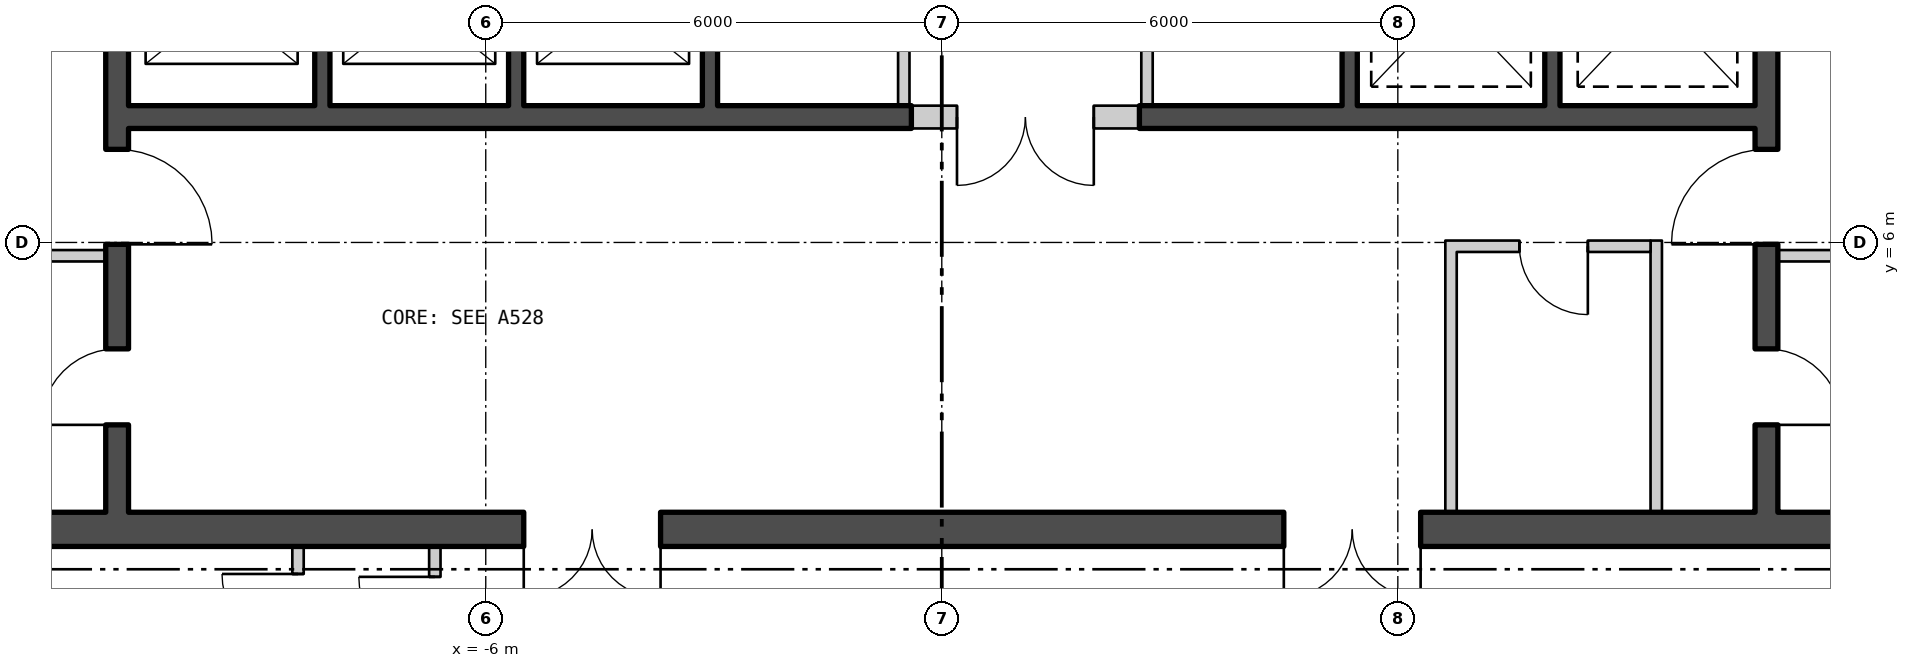
"""IFC4 building model, lengths in metres.
Left out: names, types, materials, properties, quantities, classifications, styles, units other than length and angle.
Written with IfcOpenShell. Run it as: python <this file> out.ifc"""

import sys

from ifc_helpers import new_model, si_unit, direction, frame, frame_2d, origin, place, context, subcontext, project, spatial, polyline, rectangle, outline, extrude, element, fill, save


model = new_model("IFC4")
c1 = context("Model", 3, precision=1e-05, world=origin(), true_north=direction((0.0, 1.0)))
c2 = subcontext(c1, "Body", "Model", "MODEL_VIEW")
j1 = project(units=[si_unit("LENGTHUNIT", "METRE"), si_unit("PLANEANGLEUNIT", "RADIAN")], contexts=[c1])
p1 = place(None, origin())
s1 = spatial("IfcSite", under=j1, at=p1, CompositionType="ELEMENT")
p2 = place(p1, origin())
s2 = spatial("IfcBuilding", under=s1, at=p2, CompositionType="ELEMENT")
p3 = place(p2, frame((0.0, 0.0, 227.7)))
s3 = spatial("IfcBuildingStorey", under=s2, at=p3, CompositionType="ELEMENT", Elevation=227.7)
p4 = place(p3, frame((-26.075, 14.415, -0.18), z_axis=(0.0, 0.0, 1.0), x_axis=(0.499999194392, -0.866025868902, 0.0)))
e1 = element("IfcWall", 1, at=p4, inside=s3, PredefinedType="SOLIDWALL", context=c2, shape_type="SweptSolid", body=[
    extrude(outline(polyline([(-0.13, -0.225), (45.86, -0.225), (45.6, 0.225), (0.13, 0.225), (-0.13, -0.225)])), origin(), (0.0, 0.0, 1.0), 3.68),
])
p5 = place(p4, frame((1.424, 0.0, 1.08)))
e2 = element("IfcOpeningElement", 2, at=p5, cuts=e1, PredefinedType="OPENING", context=c2, shape_type="SweptSolid", body=[
    extrude(rectangle(XDim=2.4, YDim=2.0, at=frame_2d((1.2, 1.0))), frame((0.0, 0.235, 0.0), z_axis=(0.0, -1.0, 0.0), x_axis=(1.0, 0.0, 0.0)), (0.0, 0.0, 1.0), 0.47),
])
p6 = place(p4, frame((5.892, 0.0, 1.08)))
e3 = element("IfcOpeningElement", 3, at=p6, cuts=e1, PredefinedType="OPENING", context=c2, shape_type="SweptSolid", body=[
    extrude(rectangle(XDim=2.4, YDim=2.0, at=frame_2d((1.2, 1.0))), frame((0.0, 0.235, 0.0), z_axis=(0.0, -1.0, 0.0), x_axis=(1.0, 0.0, 0.0)), (0.0, 0.0, 1.0), 0.47),
])
p7 = place(p4, frame((10.399, 0.0, 1.08)))
e4 = element("IfcOpeningElement", 4, at=p7, cuts=e1, PredefinedType="OPENING", context=c2, shape_type="SweptSolid", body=[
    extrude(rectangle(XDim=2.4, YDim=2.0, at=frame_2d((1.2, 1.0))), frame((0.0, 0.235, 0.0), z_axis=(0.0, -1.0, 0.0), x_axis=(1.0, 0.0, 0.0)), (0.0, 0.0, 1.0), 0.47),
])
p8 = place(p4, frame((19.412, 0.0, 1.08)))
e5 = element("IfcOpeningElement", 5, at=p8, cuts=e1, PredefinedType="OPENING", context=c2, shape_type="SweptSolid", body=[
    extrude(rectangle(XDim=2.4, YDim=2.0, at=frame_2d((1.2, 1.0))), frame((0.0, 0.235, 0.0), z_axis=(0.0, -1.0, 0.0), x_axis=(1.0, 0.0, 0.0)), (0.0, 0.0, 1.0), 0.47),
])
p9 = place(p4, frame((23.918, 0.0, 1.08)))
e6 = element("IfcOpeningElement", 6, at=p9, cuts=e1, PredefinedType="OPENING", context=c2, shape_type="SweptSolid", body=[
    extrude(rectangle(XDim=2.4, YDim=2.0, at=frame_2d((1.2, 1.0))), frame((0.0, 0.235, 0.0), z_axis=(0.0, -1.0, 0.0), x_axis=(1.0, 0.0, 0.0)), (0.0, 0.0, 1.0), 0.47),
])
p10 = place(p4, frame((28.425, 0.0, 1.08)))
e7 = element("IfcOpeningElement", 7, at=p10, cuts=e1, PredefinedType="OPENING", context=c2, shape_type="SweptSolid", body=[
    extrude(rectangle(XDim=2.4, YDim=2.0, at=frame_2d((1.2, 1.0))), frame((0.0, 0.235, 0.0), z_axis=(0.0, -1.0, 0.0), x_axis=(1.0, 0.0, 0.0)), (0.0, 0.0, 1.0), 0.47),
])
p11 = place(p4, frame((32.932, 0.0, 1.08)))
e8 = element("IfcOpeningElement", 8, at=p11, cuts=e1, PredefinedType="OPENING", context=c2, shape_type="SweptSolid", body=[
    extrude(rectangle(XDim=2.4, YDim=2.0, at=frame_2d((1.2, 1.0))), frame((0.0, 0.235, 0.0), z_axis=(0.0, -1.0, 0.0), x_axis=(1.0, 0.0, 0.0)), (0.0, 0.0, 1.0), 0.47),
])
p12 = place(p4, frame((41.907, 0.0, 1.08)))
e9 = element("IfcOpeningElement", 9, at=p12, cuts=e1, PredefinedType="OPENING", context=c2, shape_type="SweptSolid", body=[
    extrude(rectangle(XDim=2.4, YDim=2.0, at=frame_2d((1.2, 1.0))), frame((0.0, 0.235, 0.0), z_axis=(0.0, -1.0, 0.0), x_axis=(1.0, 0.0, 0.0)), (0.0, 0.0, 1.0), 0.47),
])
p13 = place(p3, frame((3.21, -25.189, -0.18), z_axis=(0.0, 0.0, 1.0), x_axis=(0.499999194392, 0.866025868902, 0.0)))
e10 = element("IfcWall", 10, at=p13, inside=s3, PredefinedType="SOLIDWALL", context=c2, shape_type="SweptSolid", body=[
    extrude(outline(polyline([(-0.13, -0.225), (45.86, -0.225), (45.6, 0.225), (0.13, 0.225), (-0.13, -0.225)])), origin(), (0.0, 0.0, 1.0), 3.68),
])
p14 = place(p13, frame((1.424, 0.0, 1.08)))
e11 = element("IfcOpeningElement", 11, at=p14, cuts=e10, PredefinedType="OPENING", context=c2, shape_type="SweptSolid", body=[
    extrude(rectangle(XDim=2.4, YDim=2.0, at=frame_2d((1.2, 1.0))), frame((0.0, 0.235, 0.0), z_axis=(0.0, -1.0, 0.0), x_axis=(1.0, 0.0, 0.0)), (0.0, 0.0, 1.0), 0.47),
])
p15 = place(p13, frame((5.892, 0.0, 1.08)))
e12 = element("IfcOpeningElement", 12, at=p15, cuts=e10, PredefinedType="OPENING", context=c2, shape_type="SweptSolid", body=[
    extrude(rectangle(XDim=2.4, YDim=2.0, at=frame_2d((1.2, 1.0))), frame((0.0, 0.235, 0.0), z_axis=(0.0, -1.0, 0.0), x_axis=(1.0, 0.0, 0.0)), (0.0, 0.0, 1.0), 0.47),
])
p16 = place(p13, frame((10.399, 0.0, 1.08)))
e13 = element("IfcOpeningElement", 13, at=p16, cuts=e10, PredefinedType="OPENING", context=c2, shape_type="SweptSolid", body=[
    extrude(rectangle(XDim=2.4, YDim=2.0, at=frame_2d((1.2, 1.0))), frame((0.0, 0.235, 0.0), z_axis=(0.0, -1.0, 0.0), x_axis=(1.0, 0.0, 0.0)), (0.0, 0.0, 1.0), 0.47),
])
p17 = place(p13, frame((14.905, 0.0, 1.08)))
e14 = element("IfcOpeningElement", 14, at=p17, cuts=e10, PredefinedType="OPENING", context=c2, shape_type="SweptSolid", body=[
    extrude(rectangle(XDim=2.4, YDim=2.0, at=frame_2d((1.2, 1.0))), frame((0.0, 0.235, 0.0), z_axis=(0.0, -1.0, 0.0), x_axis=(1.0, 0.0, 0.0)), (0.0, 0.0, 1.0), 0.47),
])
p18 = place(p13, frame((19.412, 0.0, 1.08)))
e15 = element("IfcOpeningElement", 15, at=p18, cuts=e10, PredefinedType="OPENING", context=c2, shape_type="SweptSolid", body=[
    extrude(rectangle(XDim=2.4, YDim=2.0, at=frame_2d((1.2, 1.0))), frame((0.0, 0.235, 0.0), z_axis=(0.0, -1.0, 0.0), x_axis=(1.0, 0.0, 0.0)), (0.0, 0.0, 1.0), 0.47),
])
p19 = place(p13, frame((23.918, 0.0, 1.08)))
e16 = element("IfcOpeningElement", 16, at=p19, cuts=e10, PredefinedType="OPENING", context=c2, shape_type="SweptSolid", body=[
    extrude(rectangle(XDim=2.4, YDim=2.0, at=frame_2d((1.2, 1.0))), frame((0.0, 0.235, 0.0), z_axis=(0.0, -1.0, 0.0), x_axis=(1.0, 0.0, 0.0)), (0.0, 0.0, 1.0), 0.47),
])
p20 = place(p13, frame((32.932, 0.0, 1.08)))
e17 = element("IfcOpeningElement", 17, at=p20, cuts=e10, PredefinedType="OPENING", context=c2, shape_type="SweptSolid", body=[
    extrude(rectangle(XDim=2.4, YDim=2.0, at=frame_2d((1.2, 1.0))), frame((0.0, 0.235, 0.0), z_axis=(0.0, -1.0, 0.0), x_axis=(1.0, 0.0, 0.0)), (0.0, 0.0, 1.0), 0.47),
])
p21 = place(p13, frame((37.438, 0.0, 1.08)))
e18 = element("IfcOpeningElement", 18, at=p21, cuts=e10, PredefinedType="OPENING", context=c2, shape_type="SweptSolid", body=[
    extrude(rectangle(XDim=2.4, YDim=2.0, at=frame_2d((1.2, 1.0))), frame((0.0, 0.235, 0.0), z_axis=(0.0, -1.0, 0.0), x_axis=(1.0, 0.0, 0.0)), (0.0, 0.0, 1.0), 0.47),
])
p22 = place(p13, frame((41.907, 0.0, 1.08)))
e19 = element("IfcOpeningElement", 19, at=p22, cuts=e10, PredefinedType="OPENING", context=c2, shape_type="SweptSolid", body=[
    extrude(rectangle(XDim=2.4, YDim=2.0, at=frame_2d((1.2, 1.0))), frame((0.0, 0.235, 0.0), z_axis=(0.0, -1.0, 0.0), x_axis=(1.0, 0.0, 0.0)), (0.0, 0.0, 1.0), 0.47),
])
p23 = place(p3, frame((-16.2, 2.225, 0.0), z_axis=(0.0, 0.0, 1.0), x_axis=(1.0, 0.0, 0.0)))
e20 = element("IfcWall", 20, at=p23, inside=s3, PredefinedType="SHEAR", context=c2, shape_type="SweptSolid", body=[
    extrude(rectangle(XDim=32.4, YDim=0.45, at=frame_2d((16.2, 0.0))), origin(), (0.0, 0.0, 1.0), 3.7),
])
p24 = place(p23, frame((10.7, 0.0, 0.0)))
e21 = element("IfcOpeningElement", 21, at=p24, cuts=e20, PredefinedType="OPENING", context=c2, shape_type="SweptSolid", body=[
    extrude(rectangle(XDim=1.8, YDim=2.4, at=frame_2d((0.9, 1.2))), frame((0.0, 0.235, 0.0), z_axis=(0.0, -1.0, 0.0), x_axis=(1.0, 0.0, 0.0)), (0.0, 0.0, 1.0), 0.47),
])
p25 = place(p23, frame((20.7, 0.0, 0.0)))
e22 = element("IfcOpeningElement", 22, at=p25, cuts=e20, PredefinedType="OPENING", context=c2, shape_type="SweptSolid", body=[
    extrude(rectangle(XDim=1.8, YDim=2.4, at=frame_2d((0.9, 1.2))), frame((0.0, 0.235, 0.0), z_axis=(0.0, -1.0, 0.0), x_axis=(1.0, 0.0, 0.0)), (0.0, 0.0, 1.0), 0.47),
])
p26 = place(p3, frame((-10.85, 2.45, 0.0), z_axis=(0.0, 0.0, 1.0), x_axis=(0.0, 1.0, 0.0)))
e23 = element("IfcWall", 23, at=p26, inside=s3, PredefinedType="SHEAR", context=c2, shape_type="SweptSolid", body=[
    extrude(rectangle(XDim=15.1, YDim=0.3, at=frame_2d((7.55, 0.0))), origin(), (0.0, 0.0, 1.0), 3.7),
])
p27 = place(p26, frame((3.525, 0.0, 0.0)))
e24 = element("IfcOpeningElement", 24, at=p27, cuts=e23, PredefinedType="OPENING", context=c2, shape_type="SweptSolid", body=[
    extrude(rectangle(XDim=1.25, YDim=2.1, at=frame_2d((0.625, 1.05))), frame((0.0, 0.16, 0.0), z_axis=(0.0, -1.0, 0.0), x_axis=(1.0, 0.0, 0.0)), (0.0, 0.0, 1.0), 0.32),
])
p28 = place(p26, frame((1.15, 0.0, 0.0)))
e25 = element("IfcOpeningElement", 25, at=p28, cuts=e23, PredefinedType="OPENING", context=c2, shape_type="SweptSolid", body=[
    extrude(rectangle(XDim=1.0, YDim=2.1, at=frame_2d((0.5, 1.05))), frame((0.0, 0.16, 0.0), z_axis=(0.0, -1.0, 0.0), x_axis=(1.0, 0.0, 0.0)), (0.0, 0.0, 1.0), 0.32),
])
p29 = place(p3, frame((10.85, 2.45, 0.0), z_axis=(0.0, 0.0, 1.0), x_axis=(0.0, 1.0, 0.0)))
e26 = element("IfcWall", 26, at=p29, inside=s3, PredefinedType="SHEAR", context=c2, shape_type="SweptSolid", body=[
    extrude(rectangle(XDim=15.1, YDim=0.3, at=frame_2d((7.55, 0.0))), origin(), (0.0, 0.0, 1.0), 3.7),
])
p30 = place(p29, frame((3.525, 0.0, 0.0)))
e27 = element("IfcOpeningElement", 27, at=p30, cuts=e26, PredefinedType="OPENING", context=c2, shape_type="SweptSolid", body=[
    extrude(rectangle(XDim=1.25, YDim=2.1, at=frame_2d((0.625, 1.05))), frame((0.0, 0.16, 0.0), z_axis=(0.0, -1.0, 0.0), x_axis=(1.0, 0.0, 0.0)), (0.0, 0.0, 1.0), 0.32),
])
p31 = place(p29, frame((1.15, 0.0, 0.0)))
e28 = element("IfcOpeningElement", 28, at=p31, cuts=e26, PredefinedType="OPENING", context=c2, shape_type="SweptSolid", body=[
    extrude(rectangle(XDim=1.0, YDim=2.1, at=frame_2d((0.5, 1.05))), frame((0.0, 0.16, 0.0), z_axis=(0.0, -1.0, 0.0), x_axis=(1.0, 0.0, 0.0)), (0.0, 0.0, 1.0), 0.32),
])
p32 = place(p3, frame((-10.7, 7.65, 0.0), z_axis=(0.0, 0.0, 1.0), x_axis=(1.0, 0.0, 0.0)))
e29 = element("IfcWall", 29, at=p32, inside=s3, PredefinedType="SHEAR", context=c2, shape_type="SweptSolid", body=[
    extrude(rectangle(XDim=10.3, YDim=0.3, at=frame_2d((5.15, 0.0))), origin(), (0.0, 0.0, 1.0), 3.7),
])
p33 = place(p3, frame((2.6, 7.65, 0.0), z_axis=(0.0, 0.0, 1.0), x_axis=(1.0, 0.0, 0.0)))
e30 = element("IfcWall", 30, at=p33, inside=s3, PredefinedType="SHEAR", context=c2, shape_type="SweptSolid", body=[
    extrude(rectangle(XDim=8.1, YDim=0.3, at=frame_2d((4.05, 0.0))), origin(), (0.0, 0.0, 1.0), 3.7),
])
for number, where, z_axis, x_axis in (
    (31, (-8.15, 7.8, 0.0), (0.0, 0.0, 1.0), (0.0, 1.0, 0.0)),
    (32, (-5.6, 7.8, 0.0), (0.0, 0.0, 1.0), (0.0, 1.0, 0.0)),
    (33, (-3.05, 7.8, 0.0), (0.0, 0.0, 1.0), (0.0, 1.0, 0.0)),
):
    element("IfcWall", number, at=place(p3, frame(where, z_axis=z_axis, x_axis=x_axis)), inside=s3, PredefinedType="SHEAR", context=c2, shape_type="SweptSolid", body=[
        extrude(rectangle(XDim=2.7, YDim=0.2, at=frame_2d((1.35, 0.0))), origin(), (0.0, 0.0, 1.0), 3.7),
    ])
for number, where, z_axis, x_axis in (
    (34, (-0.5, 7.8, 0.0), (0.0, 0.0, 1.0), (0.0, 1.0, 0.0)),
    (35, (2.7, 7.8, 0.0), (0.0, 0.0, 1.0), (0.0, 1.0, 0.0)),
):
    element("IfcWall", number, at=place(p3, frame(where, z_axis=z_axis, x_axis=x_axis)), inside=s3, PredefinedType="PARTITIONING", context=c2, shape_type="SweptSolid", body=[
        extrude(rectangle(XDim=2.7, YDim=0.15, at=frame_2d((1.35, 0.0))), origin(), (0.0, 0.0, 1.0), 3.7),
    ])
for number, where, z_axis, x_axis in (
    (36, (5.367, 7.8, 0.0), (0.0, 0.0, 1.0), (0.0, 1.0, 0.0)),
    (37, (8.033, 7.8, 0.0), (0.0, 0.0, 1.0), (0.0, 1.0, 0.0)),
):
    element("IfcWall", number, at=place(p3, frame(where, z_axis=z_axis, x_axis=x_axis)), inside=s3, PredefinedType="SHEAR", context=c2, shape_type="SweptSolid", body=[
        extrude(rectangle(XDim=2.7, YDim=0.2, at=frame_2d((1.35, 0.0))), origin(), (0.0, 0.0, 1.0), 3.7),
    ])
for number, where, z_axis, x_axis in (
    (38, (-14.2, 5.825, 0.0), (0.0, 0.0, 1.0), (1.0, 0.0, 0.0)),
    (39, (11.0, 5.825, 0.0), (0.0, 0.0, 1.0), (1.0, 0.0, 0.0)),
):
    element("IfcWall", number, at=place(p3, frame(where, z_axis=z_axis, x_axis=x_axis)), inside=s3, PredefinedType="PARTITIONING", context=c2, shape_type="SweptSolid", body=[
        extrude(rectangle(XDim=3.2, YDim=0.15, at=frame_2d((1.6, 0.0))), origin(), (0.0, 0.0, 1.0), 3.7),
    ])
for number, where, z_axis, x_axis in (
    (40, (6.7, 2.45, 0.0), (0.0, 0.0, 1.0), (0.0, 1.0, 0.0)),
    (41, (9.4, 2.45, 0.0), (0.0, 0.0, 1.0), (0.0, 1.0, 0.0)),
):
    element("IfcWall", number, at=place(p3, frame(where, z_axis=z_axis, x_axis=x_axis)), inside=s3, PredefinedType="PARTITIONING", context=c2, shape_type="SweptSolid", body=[
        extrude(rectangle(XDim=3.575, YDim=0.15, at=frame_2d((1.788, 0.0))), origin(), (0.0, 0.0, 1.0), 3.7),
    ])
p34 = place(p3, frame((6.775, 5.95, 0.0), z_axis=(0.0, 0.0, 1.0), x_axis=(1.0, 0.0, 0.0)))
e42 = element("IfcWall", 42, at=p34, inside=s3, PredefinedType="PARTITIONING", context=c2, shape_type="SweptSolid", body=[
    extrude(rectangle(XDim=2.55, YDim=0.15, at=frame_2d((1.275, 0.0))), origin(), (0.0, 0.0, 1.0), 3.7),
])
p35 = place(p34, frame((0.825, 0.0, 0.0)))
e43 = element("IfcOpeningElement", 43, at=p35, cuts=e42, PredefinedType="OPENING", context=c2, shape_type="SweptSolid", body=[
    extrude(rectangle(XDim=0.9, YDim=2.1, at=frame_2d((0.45, 1.05))), frame((0.0, 0.085, 0.0), z_axis=(0.0, -1.0, 0.0), x_axis=(1.0, 0.0, 0.0)), (0.0, 0.0, 1.0), 0.17),
])
p36 = place(p3, frame((-0.4, 7.65, 0.0), z_axis=(0.0, 0.0, 1.0), x_axis=(1.0, 0.0, 0.0)))
e44 = element("IfcWall", 44, at=p36, inside=s3, PredefinedType="PARTITIONING", context=c2, shape_type="SweptSolid", body=[
    extrude(rectangle(XDim=3.0, YDim=0.3, at=frame_2d((1.5, 0.0))), origin(), (0.0, 0.0, 1.0), 3.7),
])
p37 = place(p36, frame((0.6, 0.0, 0.0)))
e45 = element("IfcOpeningElement", 45, at=p37, cuts=e44, PredefinedType="OPENING", context=c2, shape_type="SweptSolid", body=[
    extrude(rectangle(XDim=1.8, YDim=2.4, at=frame_2d((0.9, 1.2))), frame((0.0, 0.16, 0.0), z_axis=(0.0, -1.0, 0.0), x_axis=(1.0, 0.0, 0.0)), (0.0, 0.0, 1.0), 0.32),
])
p38 = place(p3, frame((-8.47, 0.275, 0.0), z_axis=(0.0, 0.0, 1.0), x_axis=(0.0, 1.0, 0.0)))
e46 = element("IfcWall", 46, at=p38, inside=s3, PredefinedType="PARTITIONING", context=c2, shape_type="SweptSolid", body=[
    extrude(rectangle(XDim=1.725, YDim=0.15, at=frame_2d((0.863, 0.0))), origin(), (0.0, 0.0, 1.0), 3.7),
])
p39 = place(p38, frame((0.363, 0.0, 0.0)))
e47 = element("IfcOpeningElement", 47, at=p39, cuts=e46, PredefinedType="OPENING", context=c2, shape_type="SweptSolid", body=[
    extrude(rectangle(XDim=1.0, YDim=2.1, at=frame_2d((0.5, 1.05))), frame((0.0, 0.085, 0.0), z_axis=(0.0, -1.0, 0.0), x_axis=(1.0, 0.0, 0.0)), (0.0, 0.0, 1.0), 0.17),
])
p40 = place(p3, frame((-6.67, -3.412, 0.0), z_axis=(0.0, 0.0, 1.0), x_axis=(0.0, 1.0, 0.0)))
e48 = element("IfcWall", 48, at=p40, inside=s3, PredefinedType="PARTITIONING", context=c2, shape_type="SweptSolid", body=[
    extrude(rectangle(XDim=5.412, YDim=0.15, at=frame_2d((2.706, 0.0))), origin(), (0.0, 0.0, 1.0), 3.7),
])
p41 = place(p40, frame((4.012, 0.0, 0.0)))
e49 = element("IfcOpeningElement", 49, at=p41, cuts=e48, PredefinedType="OPENING", context=c2, shape_type="SweptSolid", body=[
    extrude(rectangle(XDim=1.0, YDim=2.1, at=frame_2d((0.5, 1.05))), frame((0.0, 0.085, 0.0), z_axis=(0.0, -1.0, 0.0), x_axis=(1.0, 0.0, 0.0)), (0.0, 0.0, 1.0), 0.17),
])
p42 = place(p27, origin())
e50 = element("IfcDoor", 50, at=p42, inside=s3, OperationType="SINGLE_SWING_LEFT", PredefinedType="DOOR", context=c2, shape_type="SweptSolid", body=[
    extrude(rectangle(XDim=1.25, YDim=2.1, at=frame_2d((0.625, 1.05))), frame((0.0, 0.025, 0.0), z_axis=(0.0, -1.0, 0.0), x_axis=(1.0, 0.0, 0.0)), (0.0, 0.0, 1.0), 0.05),
])
fill(e24, e50)
p43 = place(p28, origin())
e51 = element("IfcDoor", 51, at=p43, inside=s3, OperationType="SINGLE_SWING_RIGHT", PredefinedType="DOOR", context=c2, shape_type="SweptSolid", body=[
    extrude(rectangle(XDim=1.0, YDim=2.1, at=frame_2d((0.5, 1.05))), frame((0.0, 0.025, 0.0), z_axis=(0.0, -1.0, 0.0), x_axis=(1.0, 0.0, 0.0)), (0.0, 0.0, 1.0), 0.05),
])
fill(e25, e51)
p44 = place(p30, origin())
e52 = element("IfcDoor", 52, at=p44, inside=s3, OperationType="SINGLE_SWING_RIGHT", PredefinedType="DOOR", context=c2, shape_type="SweptSolid", body=[
    extrude(rectangle(XDim=1.25, YDim=2.1, at=frame_2d((0.625, 1.05))), frame((0.0, 0.025, 0.0), z_axis=(0.0, -1.0, 0.0), x_axis=(1.0, 0.0, 0.0)), (0.0, 0.0, 1.0), 0.05),
])
fill(e27, e52)
p45 = place(p31, origin())
e53 = element("IfcDoor", 53, at=p45, inside=s3, OperationType="SINGLE_SWING_LEFT", PredefinedType="DOOR", context=c2, shape_type="SweptSolid", body=[
    extrude(rectangle(XDim=1.0, YDim=2.1, at=frame_2d((0.5, 1.05))), frame((0.0, 0.025, 0.0), z_axis=(0.0, -1.0, 0.0), x_axis=(1.0, 0.0, 0.0)), (0.0, 0.0, 1.0), 0.05),
])
fill(e28, e53)
p46 = place(p35, origin())
e54 = element("IfcDoor", 54, at=p46, inside=s3, OperationType="SINGLE_SWING_RIGHT", PredefinedType="DOOR", context=c2, shape_type="SweptSolid", body=[
    extrude(rectangle(XDim=0.9, YDim=2.1, at=frame_2d((0.45, 1.05))), frame((0.0, 0.025, 0.0), z_axis=(0.0, -1.0, 0.0), x_axis=(1.0, 0.0, 0.0)), (0.0, 0.0, 1.0), 0.05),
])
fill(e43, e54)
p47 = place(p37, origin())
e55 = element("IfcDoor", 55, at=p47, inside=s3, OperationType="DOUBLE_DOOR_SINGLE_SWING", PredefinedType="DOOR", context=c2, shape_type="SweptSolid", body=[
    extrude(rectangle(XDim=1.8, YDim=2.4, at=frame_2d((0.9, 1.2))), frame((0.0, 0.025, 0.0), z_axis=(0.0, -1.0, 0.0), x_axis=(1.0, 0.0, 0.0)), (0.0, 0.0, 1.0), 0.05),
])
fill(e45, e55)
p48 = place(p24, origin())
e56 = element("IfcDoor", 56, at=p48, inside=s3, OperationType="DOUBLE_DOOR_SINGLE_SWING", PredefinedType="DOOR", context=c2, shape_type="SweptSolid", body=[
    extrude(rectangle(XDim=1.8, YDim=2.4, at=frame_2d((0.9, 1.2))), frame((0.0, 0.025, 0.0), z_axis=(0.0, -1.0, 0.0), x_axis=(1.0, 0.0, 0.0)), (0.0, 0.0, 1.0), 0.05),
])
fill(e21, e56)
p49 = place(p25, origin())
e57 = element("IfcDoor", 57, at=p49, inside=s3, OperationType="DOUBLE_DOOR_SINGLE_SWING", PredefinedType="DOOR", context=c2, shape_type="SweptSolid", body=[
    extrude(rectangle(XDim=1.8, YDim=2.4, at=frame_2d((0.9, 1.2))), frame((0.0, 0.025, 0.0), z_axis=(0.0, -1.0, 0.0), x_axis=(1.0, 0.0, 0.0)), (0.0, 0.0, 1.0), 0.05),
])
fill(e22, e57)
p50 = place(p39, origin())
e58 = element("IfcDoor", 58, at=p50, inside=s3, OperationType="SINGLE_SWING_LEFT", PredefinedType="DOOR", context=c2, shape_type="SweptSolid", body=[
    extrude(rectangle(XDim=1.0, YDim=2.1, at=frame_2d((0.5, 1.05))), frame((0.0, 0.025, 0.0), z_axis=(0.0, -1.0, 0.0), x_axis=(1.0, 0.0, 0.0)), (0.0, 0.0, 1.0), 0.05),
])
fill(e47, e58)
p51 = place(p41, origin())
e59 = element("IfcDoor", 59, at=p51, inside=s3, OperationType="SINGLE_SWING_LEFT", PredefinedType="DOOR", context=c2, shape_type="SweptSolid", body=[
    extrude(rectangle(XDim=1.0, YDim=2.1, at=frame_2d((0.5, 1.05))), frame((0.0, 0.025, 0.0), z_axis=(0.0, -1.0, 0.0), x_axis=(1.0, 0.0, 0.0)), (0.0, 0.0, 1.0), 0.05),
])
fill(e49, e59)
save(model, sys.argv[1])
